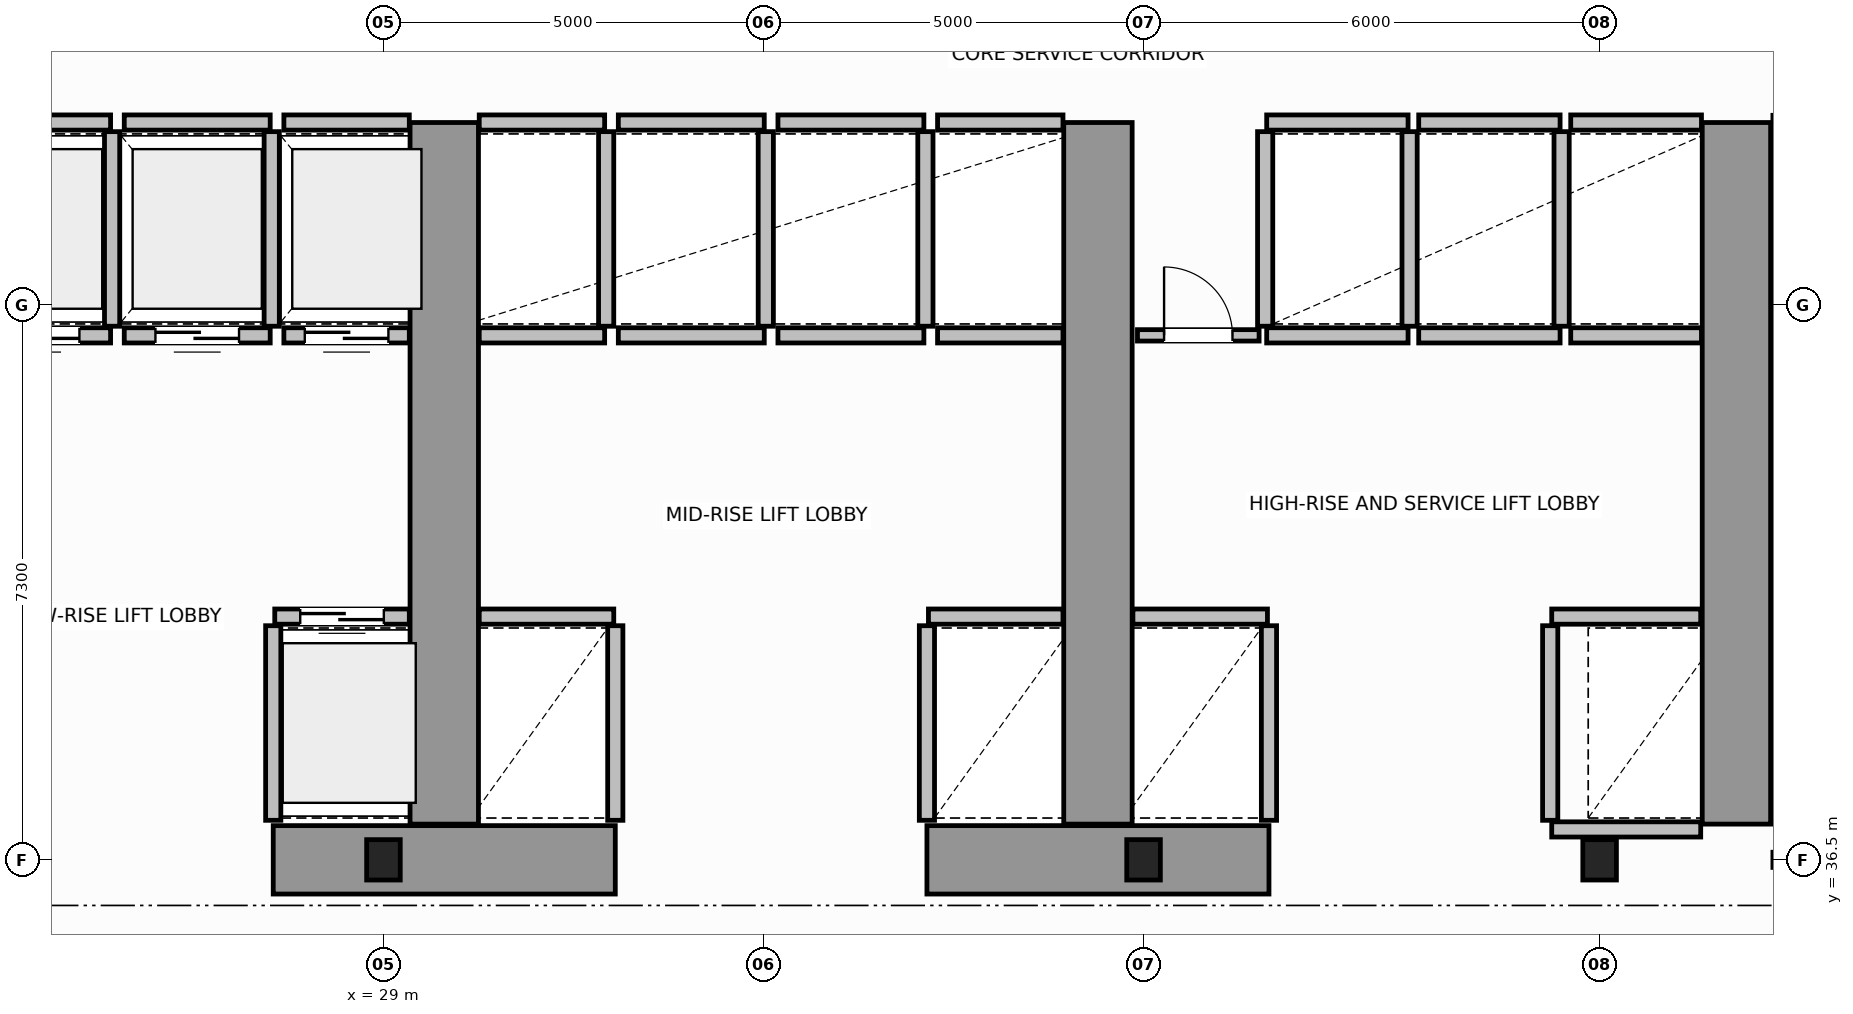
"""IFC4 building model, lengths in metres.
Left out: names, types, materials, properties, quantities, classifications, styles, units other than length and angle.
Written with IfcOpenShell. Run it as: python <this file> out.ifc"""

import sys

from ifc_helpers import new_model, si_unit, direction, frame, frame_2d, origin, origin_2d, place, context, subcontext, project, spatial, rectangle, i_section, extrude, source, transform, mapped, element, fill, save


model = new_model("IFC4")
c1 = context("Model", 3, precision=1e-05, world=origin(), true_north=direction((0.0, 1.0)))
c2 = subcontext(c1, "Body", "Model", "MODEL_VIEW")
j1 = project(units=[si_unit("LENGTHUNIT", "METRE"), si_unit("PLANEANGLEUNIT", "RADIAN")], contexts=[c1])
p1 = place(None, origin())
s1 = spatial("IfcSite", under=j1, at=p1, CompositionType="ELEMENT")
p2 = place(p1, origin())
s2 = spatial("IfcBuilding", under=s1, at=p2, CompositionType="ELEMENT")
p3 = place(p2, frame((0.0, 0.0, 79.6)))
s3 = spatial("IfcBuildingStorey", under=s2, at=p3, CompositionType="ELEMENT", Elevation=79.6)
m1 = source(origin(), c2, "Body", "SweptSolid", [
    extrude(i_section(OverallWidth=0.442, OverallDepth=0.531, WebThickness=0.065, FlangeThickness=0.076, FilletRadius=0.015, at=origin_2d()), origin(), (0.0, 0.0, 1.0), 3.8),
])
for number, where, z_axis, x_axis in (
    (1, (29.0, 36.5, 0.0), (0.0, 0.0, 1.0), (1.0, 0.0, 0.0)),
    (2, (39.0, 36.5, 0.0), (0.0, 0.0, 1.0), (1.0, 0.0, 0.0)),
    (3, (45.0, 36.5, 0.0), (0.0, 0.0, 1.0), (1.0, 0.0, 0.0)),
):
    element("IfcColumn", number, at=place(p3, frame(where, z_axis=z_axis, x_axis=x_axis)), inside=s3, PredefinedType="COLUMN", context=c2, shape_type="MappedRepresentation", body=[
        mapped(m1, transform((0.0, 0.0, 0.0), scale=1.0)),
    ])
for number, where, z_axis, x_axis in (
    (4, (27.55, 36.5, 0.0), (0.0, 0.0, 1.0), (1.0, 0.0, 0.0)),
    (5, (36.15, 36.5, 0.0), (0.0, 0.0, 1.0), (1.0, 0.0, 0.0)),
):
    element("IfcWall", number, at=place(p3, frame(where, z_axis=z_axis, x_axis=x_axis)), inside=s3, PredefinedType="SHEAR", context=c2, shape_type="SweptSolid", body=[
        extrude(rectangle(XDim=4.5, YDim=0.9, at=frame_2d((2.25, 0.0))), origin(), (0.0, 0.0, 1.0), 3.8),
    ])
for number, where, z_axis, x_axis in (
    (6, (29.8, 36.97, 0.0), (0.0, 0.0, 1.0), (0.0, 1.0, 0.0)),
    (7, (38.4, 36.97, 0.0), (0.0, 0.0, 1.0), (0.0, 1.0, 0.0)),
    (8, (46.8, 36.97, 0.0), (0.0, 0.0, 1.0), (0.0, 1.0, 0.0)),
):
    element("IfcWall", number, at=place(p3, frame(where, z_axis=z_axis, x_axis=x_axis)), inside=s3, PredefinedType="SHEAR", context=c2, shape_type="SweptSolid", body=[
        extrude(rectangle(XDim=9.23, YDim=0.9, at=frame_2d((4.615, 0.0))), origin(), (0.0, 0.0, 1.0), 3.8),
    ])
p4 = place(p3, frame((47.28, 36.5, 0.0), z_axis=(0.0, 0.0, 1.0), x_axis=(1.0, 0.0, 0.0)))
e9 = element("IfcWall", 9, at=p4, inside=s3, PredefinedType="SOLIDWALL", context=c2, shape_type="SweptSolid", body=[
    extrude(rectangle(XDim=2.47, YDim=0.2, at=frame_2d((1.235, 0.0))), origin(), (0.0, 0.0, 1.0), 2.33),
])
p5 = place(p4, frame((0.65, 0.0, 0.0)))
e10 = element("IfcOpeningElement", 10, at=p5, cuts=e9, PredefinedType="OPENING", context=c2, shape_type="SweptSolid", body=[
    extrude(rectangle(XDim=1.1, YDim=2.15, at=frame_2d((0.55, 1.075))), frame((0.0, 0.11, 0.0), z_axis=(0.0, -1.0, 0.0), x_axis=(1.0, 0.0, 0.0)), (0.0, 0.0, 1.0), 0.22),
])
p6 = place(p3, frame((27.57, 39.7, 0.0), z_axis=(0.0, 0.0, 1.0), x_axis=(1.0, 0.0, 0.0)))
e11 = element("IfcWall", 11, at=p6, inside=s3, PredefinedType="SOLIDWALL", context=c2, shape_type="SweptSolid", body=[
    extrude(rectangle(XDim=1.77, YDim=0.2, at=frame_2d((0.885, 0.0))), origin(), (0.0, 0.0, 1.0), 3.54),
])
p7 = place(p6, frame((0.335, 0.0, 0.0)))
e12 = element("IfcOpeningElement", 12, at=p7, cuts=e11, PredefinedType="OPENING", context=c2, shape_type="SweptSolid", body=[
    extrude(rectangle(XDim=1.1, YDim=2.15, at=frame_2d((0.55, 1.075))), frame((0.0, 0.11, 0.0), z_axis=(0.0, -1.0, 0.0), x_axis=(1.0, 0.0, 0.0)), (0.0, 0.0, 1.0), 0.22),
])
p8 = place(p3, frame((27.55, 37.02, 0.0), z_axis=(0.0, 0.0, 1.0), x_axis=(0.0, 1.0, 0.0)))
e13 = element("IfcWall", 13, at=p8, inside=s3, PredefinedType="SOLIDWALL", context=c2, shape_type="SweptSolid", body=[
    extrude(rectangle(XDim=2.56, YDim=0.2, at=frame_2d((1.28, 0.0))), origin(), (0.0, 0.0, 1.0), 3.54),
])
p9 = place(p3, frame((23.49, 43.4, 0.0), z_axis=(0.0, 0.0, 1.0), x_axis=(1.0, 0.0, 0.0)))
e14 = element("IfcWall", 14, at=p9, inside=s3, PredefinedType="SOLIDWALL", context=c2, shape_type="SweptSolid", body=[
    extrude(rectangle(XDim=1.92, YDim=0.2, at=frame_2d((0.96, 0.0))), origin(), (0.0, 0.0, 1.0), 3.54),
])
p10 = place(p9, frame((0.41, 0.0, 0.0)))
e15 = element("IfcOpeningElement", 15, at=p10, cuts=e14, PredefinedType="OPENING", context=c2, shape_type="SweptSolid", body=[
    extrude(rectangle(XDim=1.1, YDim=2.15, at=frame_2d((0.55, 1.075))), frame((0.0, 0.11, 0.0), z_axis=(0.0, -1.0, 0.0), x_axis=(1.0, 0.0, 0.0)), (0.0, 0.0, 1.0), 0.22),
])
p11 = place(p3, frame((23.49, 46.2, 0.0), z_axis=(0.0, 0.0, 1.0), x_axis=(1.0, 0.0, 0.0)))
e16 = element("IfcWall", 16, at=p11, inside=s3, PredefinedType="SOLIDWALL", context=c2, shape_type="SweptSolid", body=[
    extrude(rectangle(XDim=1.92, YDim=0.2, at=frame_2d((0.96, 0.0))), origin(), (0.0, 0.0, 1.0), 3.54),
])
p12 = place(p3, frame((25.43, 43.52, 0.0), z_axis=(0.0, 0.0, 1.0), x_axis=(0.0, 1.0, 0.0)))
e17 = element("IfcWall", 17, at=p12, inside=s3, PredefinedType="SOLIDWALL", context=c2, shape_type="SweptSolid", body=[
    extrude(rectangle(XDim=2.56, YDim=0.2, at=frame_2d((1.28, 0.0))), origin(), (0.0, 0.0, 1.0), 3.54),
])
p13 = place(p3, frame((25.59, 43.4, 0.0), z_axis=(0.0, 0.0, 1.0), x_axis=(1.0, 0.0, 0.0)))
e18 = element("IfcWall", 18, at=p13, inside=s3, PredefinedType="SOLIDWALL", context=c2, shape_type="SweptSolid", body=[
    extrude(rectangle(XDim=1.92, YDim=0.2, at=frame_2d((0.96, 0.0))), origin(), (0.0, 0.0, 1.0), 3.54),
])
p14 = place(p13, frame((0.41, 0.0, 0.0)))
e19 = element("IfcOpeningElement", 19, at=p14, cuts=e18, PredefinedType="OPENING", context=c2, shape_type="SweptSolid", body=[
    extrude(rectangle(XDim=1.1, YDim=2.15, at=frame_2d((0.55, 1.075))), frame((0.0, 0.11, 0.0), z_axis=(0.0, -1.0, 0.0), x_axis=(1.0, 0.0, 0.0)), (0.0, 0.0, 1.0), 0.22),
])
p15 = place(p3, frame((25.59, 46.2, 0.0), z_axis=(0.0, 0.0, 1.0), x_axis=(1.0, 0.0, 0.0)))
e20 = element("IfcWall", 20, at=p15, inside=s3, PredefinedType="SOLIDWALL", context=c2, shape_type="SweptSolid", body=[
    extrude(rectangle(XDim=1.92, YDim=0.2, at=frame_2d((0.96, 0.0))), origin(), (0.0, 0.0, 1.0), 3.54),
])
p16 = place(p3, frame((27.53, 43.52, 0.0), z_axis=(0.0, 0.0, 1.0), x_axis=(0.0, 1.0, 0.0)))
e21 = element("IfcWall", 21, at=p16, inside=s3, PredefinedType="SOLIDWALL", context=c2, shape_type="SweptSolid", body=[
    extrude(rectangle(XDim=2.56, YDim=0.2, at=frame_2d((1.28, 0.0))), origin(), (0.0, 0.0, 1.0), 3.54),
])
p17 = place(p3, frame((27.69, 43.4, 0.0), z_axis=(0.0, 0.0, 1.0), x_axis=(1.0, 0.0, 0.0)))
e22 = element("IfcWall", 22, at=p17, inside=s3, PredefinedType="SOLIDWALL", context=c2, shape_type="SweptSolid", body=[
    extrude(rectangle(XDim=1.65, YDim=0.2, at=frame_2d((0.825, 0.0))), origin(), (0.0, 0.0, 1.0), 3.54),
])
p18 = place(p17, frame((0.275, 0.0, 0.0)))
e23 = element("IfcOpeningElement", 23, at=p18, cuts=e22, PredefinedType="OPENING", context=c2, shape_type="SweptSolid", body=[
    extrude(rectangle(XDim=1.1, YDim=2.15, at=frame_2d((0.55, 1.075))), frame((0.0, 0.11, 0.0), z_axis=(0.0, -1.0, 0.0), x_axis=(1.0, 0.0, 0.0)), (0.0, 0.0, 1.0), 0.22),
])
p19 = place(p3, frame((27.69, 46.2, 0.0), z_axis=(0.0, 0.0, 1.0), x_axis=(1.0, 0.0, 0.0)))
e24 = element("IfcWall", 24, at=p19, inside=s3, PredefinedType="SOLIDWALL", context=c2, shape_type="SweptSolid", body=[
    extrude(rectangle(XDim=1.65, YDim=0.2, at=frame_2d((0.825, 0.0))), origin(), (0.0, 0.0, 1.0), 3.54),
])
p20 = place(p3, frame((30.26, 39.7, 0.0), z_axis=(0.0, 0.0, 1.0), x_axis=(1.0, 0.0, 0.0)))
e25 = element("IfcWall", 25, at=p20, inside=s3, PredefinedType="SOLIDWALL", context=c2, shape_type="SweptSolid", body=[
    extrude(rectangle(XDim=1.77, YDim=0.2, at=frame_2d((0.885, 0.0))), origin(), (0.0, 0.0, 1.0), 3.54),
])
p21 = place(p3, frame((32.05, 37.02, 0.0), z_axis=(0.0, 0.0, 1.0), x_axis=(0.0, 1.0, 0.0)))
e26 = element("IfcWall", 26, at=p21, inside=s3, PredefinedType="SOLIDWALL", context=c2, shape_type="SweptSolid", body=[
    extrude(rectangle(XDim=2.56, YDim=0.2, at=frame_2d((1.28, 0.0))), origin(), (0.0, 0.0, 1.0), 3.54),
])
p22 = place(p3, frame((36.17, 39.7, 0.0), z_axis=(0.0, 0.0, 1.0), x_axis=(1.0, 0.0, 0.0)))
e27 = element("IfcWall", 27, at=p22, inside=s3, PredefinedType="SOLIDWALL", context=c2, shape_type="SweptSolid", body=[
    extrude(rectangle(XDim=1.77, YDim=0.2, at=frame_2d((0.885, 0.0))), origin(), (0.0, 0.0, 1.0), 3.54),
])
p23 = place(p3, frame((36.15, 37.02, 0.0), z_axis=(0.0, 0.0, 1.0), x_axis=(0.0, 1.0, 0.0)))
e28 = element("IfcWall", 28, at=p23, inside=s3, PredefinedType="SOLIDWALL", context=c2, shape_type="SweptSolid", body=[
    extrude(rectangle(XDim=2.56, YDim=0.2, at=frame_2d((1.28, 0.0))), origin(), (0.0, 0.0, 1.0), 3.54),
])
for number, where, z_axis, x_axis in (
    (29, (30.26, 43.4, 0.0), (0.0, 0.0, 1.0), (1.0, 0.0, 0.0)),
    (30, (30.26, 46.2, 0.0), (0.0, 0.0, 1.0), (1.0, 0.0, 0.0)),
):
    element("IfcWall", number, at=place(p3, frame(where, z_axis=z_axis, x_axis=x_axis)), inside=s3, PredefinedType="SOLIDWALL", context=c2, shape_type="SweptSolid", body=[
        extrude(rectangle(XDim=1.65, YDim=0.2, at=frame_2d((0.825, 0.0))), origin(), (0.0, 0.0, 1.0), 3.54),
    ])
p24 = place(p3, frame((31.93, 43.52, 0.0), z_axis=(0.0, 0.0, 1.0), x_axis=(0.0, 1.0, 0.0)))
e31 = element("IfcWall", 31, at=p24, inside=s3, PredefinedType="SOLIDWALL", context=c2, shape_type="SweptSolid", body=[
    extrude(rectangle(XDim=2.56, YDim=0.2, at=frame_2d((1.28, 0.0))), origin(), (0.0, 0.0, 1.0), 3.54),
])
for number, where, z_axis, x_axis in (
    (32, (32.09, 43.4, 0.0), (0.0, 0.0, 1.0), (1.0, 0.0, 0.0)),
    (33, (32.09, 46.2, 0.0), (0.0, 0.0, 1.0), (1.0, 0.0, 0.0)),
):
    element("IfcWall", number, at=place(p3, frame(where, z_axis=z_axis, x_axis=x_axis)), inside=s3, PredefinedType="SOLIDWALL", context=c2, shape_type="SweptSolid", body=[
        extrude(rectangle(XDim=1.92, YDim=0.2, at=frame_2d((0.96, 0.0))), origin(), (0.0, 0.0, 1.0), 3.54),
    ])
p25 = place(p3, frame((34.03, 43.52, 0.0), z_axis=(0.0, 0.0, 1.0), x_axis=(0.0, 1.0, 0.0)))
e34 = element("IfcWall", 34, at=p25, inside=s3, PredefinedType="SOLIDWALL", context=c2, shape_type="SweptSolid", body=[
    extrude(rectangle(XDim=2.56, YDim=0.2, at=frame_2d((1.28, 0.0))), origin(), (0.0, 0.0, 1.0), 3.54),
])
for number, where, z_axis, x_axis in (
    (35, (34.19, 43.4, 0.0), (0.0, 0.0, 1.0), (1.0, 0.0, 0.0)),
    (36, (34.19, 46.2, 0.0), (0.0, 0.0, 1.0), (1.0, 0.0, 0.0)),
):
    element("IfcWall", number, at=place(p3, frame(where, z_axis=z_axis, x_axis=x_axis)), inside=s3, PredefinedType="SOLIDWALL", context=c2, shape_type="SweptSolid", body=[
        extrude(rectangle(XDim=1.92, YDim=0.2, at=frame_2d((0.96, 0.0))), origin(), (0.0, 0.0, 1.0), 3.54),
    ])
p26 = place(p3, frame((36.13, 43.52, 0.0), z_axis=(0.0, 0.0, 1.0), x_axis=(0.0, 1.0, 0.0)))
e37 = element("IfcWall", 37, at=p26, inside=s3, PredefinedType="SOLIDWALL", context=c2, shape_type="SweptSolid", body=[
    extrude(rectangle(XDim=2.56, YDim=0.2, at=frame_2d((1.28, 0.0))), origin(), (0.0, 0.0, 1.0), 3.54),
])
for number, where, z_axis, x_axis in (
    (38, (36.29, 43.4, 0.0), (0.0, 0.0, 1.0), (1.0, 0.0, 0.0)),
    (39, (36.29, 46.2, 0.0), (0.0, 0.0, 1.0), (1.0, 0.0, 0.0)),
):
    element("IfcWall", number, at=place(p3, frame(where, z_axis=z_axis, x_axis=x_axis)), inside=s3, PredefinedType="SOLIDWALL", context=c2, shape_type="SweptSolid", body=[
        extrude(rectangle(XDim=1.65, YDim=0.2, at=frame_2d((0.825, 0.0))), origin(), (0.0, 0.0, 1.0), 3.54),
    ])
p27 = place(p3, frame((38.86, 39.7, 0.0), z_axis=(0.0, 0.0, 1.0), x_axis=(1.0, 0.0, 0.0)))
e40 = element("IfcWall", 40, at=p27, inside=s3, PredefinedType="SOLIDWALL", context=c2, shape_type="SweptSolid", body=[
    extrude(rectangle(XDim=1.77, YDim=0.2, at=frame_2d((0.885, 0.0))), origin(), (0.0, 0.0, 1.0), 3.54),
])
p28 = place(p3, frame((40.65, 37.02, 0.0), z_axis=(0.0, 0.0, 1.0), x_axis=(0.0, 1.0, 0.0)))
e41 = element("IfcWall", 41, at=p28, inside=s3, PredefinedType="SOLIDWALL", context=c2, shape_type="SweptSolid", body=[
    extrude(rectangle(XDim=2.56, YDim=0.2, at=frame_2d((1.28, 0.0))), origin(), (0.0, 0.0, 1.0), 3.54),
])
p29 = place(p3, frame((44.37, 39.7, 0.0), z_axis=(0.0, 0.0, 1.0), x_axis=(1.0, 0.0, 0.0)))
e42 = element("IfcWall", 42, at=p29, inside=s3, PredefinedType="SOLIDWALL", context=c2, shape_type="SweptSolid", body=[
    extrude(rectangle(XDim=1.96, YDim=0.2, at=frame_2d((0.98, 0.0))), origin(), (0.0, 0.0, 1.0), 3.54),
])
p30 = place(p3, frame((44.37, 36.9, 0.0), z_axis=(0.0, 0.0, 1.0), x_axis=(1.0, 0.0, 0.0)))
e43 = element("IfcWall", 43, at=p30, inside=s3, PredefinedType="SOLIDWALL", context=c2, shape_type="SweptSolid", body=[
    extrude(rectangle(XDim=1.96, YDim=0.2, at=frame_2d((0.98, 0.0))), origin(), (0.0, 0.0, 1.0), 2.33),
])
p31 = place(p3, frame((44.35, 37.02, 0.0), z_axis=(0.0, 0.0, 1.0), x_axis=(0.0, 1.0, 0.0)))
e44 = element("IfcWall", 44, at=p31, inside=s3, PredefinedType="SOLIDWALL", context=c2, shape_type="SweptSolid", body=[
    extrude(rectangle(XDim=2.56, YDim=0.2, at=frame_2d((1.28, 0.0))), origin(), (0.0, 0.0, 1.0), 3.54),
])
for number, where, z_axis, x_axis in (
    (45, (40.62, 43.4, 0.0), (0.0, 0.0, 1.0), (1.0, 0.0, 0.0)),
    (46, (40.62, 46.2, 0.0), (0.0, 0.0, 1.0), (1.0, 0.0, 0.0)),
):
    element("IfcWall", number, at=place(p3, frame(where, z_axis=z_axis, x_axis=x_axis)), inside=s3, PredefinedType="SOLIDWALL", context=c2, shape_type="SweptSolid", body=[
        extrude(rectangle(XDim=1.86, YDim=0.2, at=frame_2d((0.93, 0.0))), origin(), (0.0, 0.0, 1.0), 3.54),
    ])
for number, where, z_axis, x_axis in (
    (47, (40.6, 43.52, 0.0), (0.0, 0.0, 1.0), (0.0, 1.0, 0.0)),
    (48, (42.5, 43.52, 0.0), (0.0, 0.0, 1.0), (0.0, 1.0, 0.0)),
):
    element("IfcWall", number, at=place(p3, frame(where, z_axis=z_axis, x_axis=x_axis)), inside=s3, PredefinedType="SOLIDWALL", context=c2, shape_type="SweptSolid", body=[
        extrude(rectangle(XDim=2.56, YDim=0.2, at=frame_2d((1.28, 0.0))), origin(), (0.0, 0.0, 1.0), 3.54),
    ])
for number, where, z_axis, x_axis in (
    (49, (42.62, 43.4, 0.0), (0.0, 0.0, 1.0), (1.0, 0.0, 0.0)),
    (50, (42.62, 46.2, 0.0), (0.0, 0.0, 1.0), (1.0, 0.0, 0.0)),
):
    element("IfcWall", number, at=place(p3, frame(where, z_axis=z_axis, x_axis=x_axis)), inside=s3, PredefinedType="SOLIDWALL", context=c2, shape_type="SweptSolid", body=[
        extrude(rectangle(XDim=1.86, YDim=0.2, at=frame_2d((0.93, 0.0))), origin(), (0.0, 0.0, 1.0), 3.54),
    ])
p32 = place(p3, frame((44.5, 43.52, 0.0), z_axis=(0.0, 0.0, 1.0), x_axis=(0.0, 1.0, 0.0)))
e51 = element("IfcWall", 51, at=p32, inside=s3, PredefinedType="SOLIDWALL", context=c2, shape_type="SweptSolid", body=[
    extrude(rectangle(XDim=2.56, YDim=0.2, at=frame_2d((1.28, 0.0))), origin(), (0.0, 0.0, 1.0), 3.54),
])
for number, where, z_axis, x_axis in (
    (52, (44.62, 43.4, 0.0), (0.0, 0.0, 1.0), (1.0, 0.0, 0.0)),
    (53, (44.62, 46.2, 0.0), (0.0, 0.0, 1.0), (1.0, 0.0, 0.0)),
):
    element("IfcWall", number, at=place(p3, frame(where, z_axis=z_axis, x_axis=x_axis)), inside=s3, PredefinedType="SOLIDWALL", context=c2, shape_type="SweptSolid", body=[
        extrude(rectangle(XDim=1.72, YDim=0.2, at=frame_2d((0.86, 0.0))), origin(), (0.0, 0.0, 1.0), 3.54),
    ])
p33 = place(p3, frame((47.26, 39.95, 0.0), z_axis=(0.0, 0.0, 1.0), x_axis=(1.0, 0.0, 0.0)))
e54 = element("IfcWall", 54, at=p33, inside=s3, PredefinedType="SOLIDWALL", context=c2, shape_type="SweptSolid", body=[
    extrude(rectangle(XDim=2.07, YDim=0.2, at=frame_2d((1.035, 0.0))), origin(), (0.0, 0.0, 1.0), 3.54),
])
p34 = place(p33, frame((0.485, 0.0, 0.0)))
e55 = element("IfcOpeningElement", 55, at=p34, cuts=e54, PredefinedType="OPENING", context=c2, shape_type="SweptSolid", body=[
    extrude(rectangle(XDim=1.1, YDim=2.15, at=frame_2d((0.55, 1.075))), frame((0.0, 0.11, 0.0), z_axis=(0.0, -1.0, 0.0), x_axis=(1.0, 0.0, 0.0)), (0.0, 0.0, 1.0), 0.22),
])
p35 = place(p3, frame((47.26, 42.75, 0.0), z_axis=(0.0, 0.0, 1.0), x_axis=(1.0, 0.0, 0.0)))
e56 = element("IfcWall", 56, at=p35, inside=s3, PredefinedType="SOLIDWALL", context=c2, shape_type="SweptSolid", body=[
    extrude(rectangle(XDim=2.07, YDim=0.2, at=frame_2d((1.035, 0.0))), origin(), (0.0, 0.0, 1.0), 3.54),
])
p36 = place(p3, frame((47.28, 46.22, 0.0), z_axis=(0.0, 0.0, 1.0), x_axis=(1.0, 0.0, 0.0)))
e57 = element("IfcWall", 57, at=p36, inside=s3, PredefinedType="PARTITIONING", context=c2, shape_type="SweptSolid", body=[
    extrude(rectangle(XDim=2.1, YDim=0.15, at=frame_2d((1.05, 0.0))), origin(), (0.0, 0.0, 1.0), 3.54),
])
p37 = place(p36, frame((0.55, 0.0, 0.0)))
e58 = element("IfcOpeningElement", 58, at=p37, cuts=e57, PredefinedType="OPENING", context=c2, shape_type="SweptSolid", body=[
    extrude(rectangle(XDim=0.9, YDim=2.1, at=frame_2d((0.45, 1.05))), frame((0.0, 0.085, 0.0), z_axis=(0.0, -1.0, 0.0), x_axis=(1.0, 0.0, 0.0)), (0.0, 0.0, 1.0), 0.17),
])
p38 = place(p3, frame((38.92, 43.4, 0.0), z_axis=(0.0, 0.0, 1.0), x_axis=(1.0, 0.0, 0.0)))
e59 = element("IfcWall", 59, at=p38, inside=s3, PredefinedType="PARTITIONING", context=c2, shape_type="SweptSolid", body=[
    extrude(rectangle(XDim=1.6, YDim=0.15, at=frame_2d((0.8, 0.0))), origin(), (0.0, 0.0, 1.0), 3.54),
])
p39 = place(p38, frame((0.35, 0.0, 0.0)))
e60 = element("IfcOpeningElement", 60, at=p39, cuts=e59, PredefinedType="OPENING", context=c2, shape_type="SweptSolid", body=[
    extrude(rectangle(XDim=0.9, YDim=2.1, at=frame_2d((0.45, 1.05))), frame((0.0, 0.085, 0.0), z_axis=(0.0, -1.0, 0.0), x_axis=(1.0, 0.0, 0.0)), (0.0, 0.0, 1.0), 0.17),
])
m2 = source(origin(), c2, "Body", "SweptSolid", [
    extrude(rectangle(XDim=1.1, YDim=2.15, at=frame_2d((0.55, 1.075))), frame((0.0, 0.025, 0.0), z_axis=(0.0, -1.0, 0.0), x_axis=(1.0, 0.0, 0.0)), (0.0, 0.0, 1.0), 0.05),
])
p40 = place(p7, origin())
e61 = element("IfcDoor", 61, at=p40, inside=s3, OperationType="DOUBLE_DOOR_SLIDING", PredefinedType="DOOR", context=c2, shape_type="MappedRepresentation", body=[
    mapped(m2, transform((0.0, 0.0, 0.0), scale=1.0)),
])
fill(e12, e61)
p41 = place(p10, origin())
e62 = element("IfcDoor", 62, at=p41, inside=s3, OperationType="DOUBLE_DOOR_SLIDING", PredefinedType="DOOR", context=c2, shape_type="MappedRepresentation", body=[
    mapped(m2, transform((0.0, 0.0, 0.0), scale=1.0)),
])
fill(e15, e62)
p42 = place(p14, origin())
e63 = element("IfcDoor", 63, at=p42, inside=s3, OperationType="DOUBLE_DOOR_SLIDING", PredefinedType="DOOR", context=c2, shape_type="MappedRepresentation", body=[
    mapped(m2, transform((0.0, 0.0, 0.0), scale=1.0)),
])
fill(e19, e63)
p43 = place(p18, origin())
e64 = element("IfcDoor", 64, at=p43, inside=s3, OperationType="DOUBLE_DOOR_SLIDING", PredefinedType="DOOR", context=c2, shape_type="MappedRepresentation", body=[
    mapped(m2, transform((0.0, 0.0, 0.0), scale=1.0)),
])
fill(e23, e64)
m3 = source(origin(), c2, "Body", "SweptSolid", [
    extrude(rectangle(XDim=0.9, YDim=2.1, at=frame_2d((0.45, 1.05))), frame((0.0, 0.025, 0.0), z_axis=(0.0, -1.0, 0.0), x_axis=(1.0, 0.0, 0.0)), (0.0, 0.0, 1.0), 0.05),
])
p44 = place(p39, origin())
e65 = element("IfcDoor", 65, at=p44, inside=s3, OperationType="SINGLE_SWING_LEFT", PredefinedType="DOOR", context=c2, shape_type="MappedRepresentation", body=[
    mapped(m3, transform((0.0, 0.0, 0.0), scale=1.0)),
])
fill(e60, e65)
save(model, sys.argv[1])
